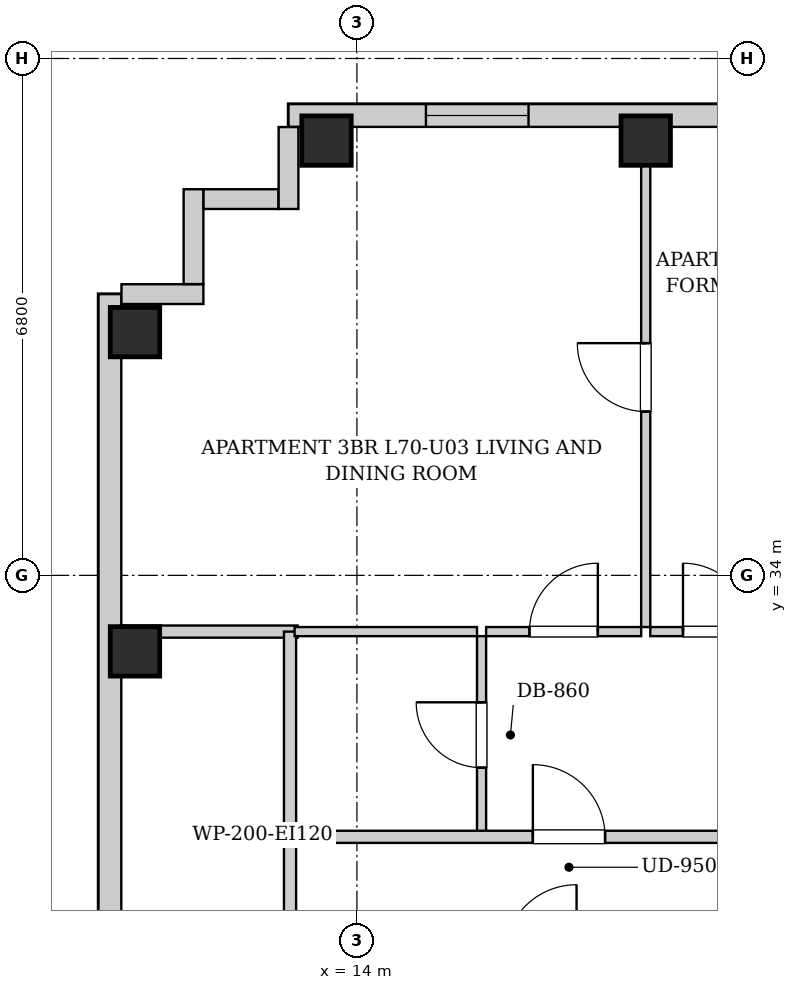
"""IFC4 building model, lengths in metres.
Left out: names, types, materials, properties, quantities, classifications, styles, units other than length and angle.
Written with IfcOpenShell. Run it as: python <this file> out.ifc"""

import sys

from ifc_helpers import new_model, si_unit, direction, frame, frame_2d, origin, origin_2d, place, context, subcontext, project, spatial, rectangle, extrude, element, fill, save


model = new_model("IFC4")
c1 = context("Model", 3, precision=1e-05, world=origin(), true_north=direction((0.0, 1.0)))
c2 = subcontext(c1, "Body", "Model", "MODEL_VIEW")
j1 = project(units=[si_unit("LENGTHUNIT", "METRE"), si_unit("PLANEANGLEUNIT", "RADIAN")], contexts=[c1])
p1 = place(None, origin())
s1 = spatial("IfcSite", under=j1, at=p1, CompositionType="ELEMENT")
p2 = place(p1, origin())
s2 = spatial("IfcBuilding", under=s1, at=p2, CompositionType="ELEMENT")
p3 = place(p2, frame((0.0, 0.0, 241.1)))
s3 = spatial("IfcBuildingStorey", under=s2, at=p3, CompositionType="ELEMENT", Elevation=241.1)
for number, where, z_axis, x_axis in (
    (1, (13.6, 39.72, 0.0), (0.0, 0.0, 1.0), (1.0, 0.0, 0.0)),
    (2, (17.8, 39.72, 0.0), (0.0, 0.0, 1.0), (1.0, 0.0, 0.0)),
    (3, (11.08, 33.0, 0.0), (0.0, 0.0, 1.0), (1.0, 0.0, 0.0)),
    (4, (11.08, 37.2, 0.0), (0.0, 0.0, 1.0), (1.0, 0.0, 0.0)),
):
    element("IfcColumn", number, at=place(p3, frame(where, z_axis=z_axis, x_axis=x_axis)), inside=s3, PredefinedType="COLUMN", context=c2, shape_type="SweptSolid", body=[
        extrude(rectangle(XDim=0.65, YDim=0.65, at=origin_2d()), origin(), (0.0, 0.0, 1.0), 3.4),
    ])
p4 = place(p3, frame((13.1, 40.05, 0.0), z_axis=(0.0, 0.0, 1.0), x_axis=(1.0, 0.0, 0.0)))
e5 = element("IfcWall", 5, at=p4, inside=s3, PredefinedType="SOLIDWALL", context=c2, shape_type="SweptSolid", body=[
    extrude(rectangle(XDim=16.4, YDim=0.3, at=frame_2d((8.2, 0.0))), origin(), (0.0, 0.0, 1.0), 3.14),
])
p5 = place(p4, frame((1.808, 0.0, 0.55)))
e6 = element("IfcOpeningElement", 6, at=p5, cuts=e5, PredefinedType="OPENING", context=c2, shape_type="SweptSolid", body=[
    extrude(rectangle(XDim=1.35, YDim=1.2, at=frame_2d((0.675, 0.6))), frame((0.0, 0.16, 0.0), z_axis=(0.0, -1.0, 0.0), x_axis=(1.0, 0.0, 0.0)), (0.0, 0.0, 1.0), 0.32),
])
p6 = place(p4, frame((6.246, 0.0, 0.55)))
e7 = element("IfcOpeningElement", 7, at=p6, cuts=e5, PredefinedType="OPENING", context=c2, shape_type="SweptSolid", body=[
    extrude(rectangle(XDim=1.35, YDim=1.2, at=frame_2d((0.675, 0.6))), frame((0.0, 0.16, 0.0), z_axis=(0.0, -1.0, 0.0), x_axis=(1.0, 0.0, 0.0)), (0.0, 0.0, 1.0), 0.32),
])
p7 = place(p4, frame((14.4, 0.0, 0.55)))
e8 = element("IfcOpeningElement", 8, at=p7, cuts=e5, PredefinedType="OPENING", context=c2, shape_type="SweptSolid", body=[
    extrude(rectangle(XDim=1.35, YDim=1.2, at=frame_2d((0.675, 0.6))), frame((0.0, 0.16, 0.0), z_axis=(0.0, -1.0, 0.0), x_axis=(1.0, 0.0, 0.0)), (0.0, 0.0, 1.0), 0.32),
])
p8 = place(p3, frame((10.75, 6.3, 0.0), z_axis=(0.0, 0.0, 1.0), x_axis=(0.0, 1.0, 0.0)))
e9 = element("IfcWall", 9, at=p8, inside=s3, PredefinedType="SOLIDWALL", context=c2, shape_type="SweptSolid", body=[
    extrude(rectangle(XDim=31.4, YDim=0.3, at=frame_2d((15.7, 0.0))), origin(), (0.0, 0.0, 1.0), 3.14),
])
p9 = place(p8, frame((1.653, 0.0, 0.55)))
e10 = element("IfcOpeningElement", 10, at=p9, cuts=e9, PredefinedType="OPENING", context=c2, shape_type="SweptSolid", body=[
    extrude(rectangle(XDim=1.35, YDim=1.2, at=frame_2d((0.675, 0.6))), frame((0.0, 0.16, 0.0), z_axis=(0.0, -1.0, 0.0), x_axis=(1.0, 0.0, 0.0)), (0.0, 0.0, 1.0), 0.32),
])
p10 = place(p8, frame((11.194, 0.0, 0.55)))
e11 = element("IfcOpeningElement", 11, at=p10, cuts=e9, PredefinedType="OPENING", context=c2, shape_type="SweptSolid", body=[
    extrude(rectangle(XDim=1.35, YDim=1.2, at=frame_2d((0.675, 0.6))), frame((0.0, 0.16, 0.0), z_axis=(0.0, -1.0, 0.0), x_axis=(1.0, 0.0, 0.0)), (0.0, 0.0, 1.0), 0.32),
])
p11 = place(p8, frame((9.185, 0.0, 0.55)))
e12 = element("IfcOpeningElement", 12, at=p11, cuts=e9, PredefinedType="OPENING", context=c2, shape_type="SweptSolid", body=[
    extrude(rectangle(XDim=1.35, YDim=1.2, at=frame_2d((0.675, 0.6))), frame((0.0, 0.16, 0.0), z_axis=(0.0, -1.0, 0.0), x_axis=(1.0, 0.0, 0.0)), (0.0, 0.0, 1.0), 0.32),
])
p12 = place(p8, frame((18.2, 0.0, 0.55)))
e13 = element("IfcOpeningElement", 13, at=p12, cuts=e9, PredefinedType="OPENING", context=c2, shape_type="SweptSolid", body=[
    extrude(rectangle(XDim=1.35, YDim=1.2, at=frame_2d((0.675, 0.6))), frame((0.0, 0.16, 0.0), z_axis=(0.0, -1.0, 0.0), x_axis=(1.0, 0.0, 0.0)), (0.0, 0.0, 1.0), 0.32),
])
p13 = place(p8, frame((19.81, 0.0, 0.55)))
e14 = element("IfcOpeningElement", 14, at=p13, cuts=e9, PredefinedType="OPENING", context=c2, shape_type="SweptSolid", body=[
    extrude(rectangle(XDim=1.35, YDim=1.2, at=frame_2d((0.675, 0.6))), frame((0.0, 0.16, 0.0), z_axis=(0.0, -1.0, 0.0), x_axis=(1.0, 0.0, 0.0)), (0.0, 0.0, 1.0), 0.32),
])
p14 = place(p3, frame((10.902, 37.7, 0.0), z_axis=(0.0, 0.0, 1.0), x_axis=(1.0, 0.0, 0.0)))
e15 = element("IfcWall", 15, at=p14, inside=s3, PredefinedType="SOLIDWALL", context=c2, shape_type="SweptSolid", body=[
    extrude(rectangle(XDim=1.078, YDim=0.26, at=frame_2d((0.539, 0.0))), origin(), (0.0, 0.0, 1.0), 3.14),
])
p15 = place(p3, frame((11.85, 37.832, 0.0), z_axis=(0.0, 0.0, 1.0), x_axis=(0.0, 1.0, 0.0)))
e16 = element("IfcWall", 16, at=p15, inside=s3, PredefinedType="SOLIDWALL", context=c2, shape_type="SweptSolid", body=[
    extrude(rectangle(XDim=1.248, YDim=0.26, at=frame_2d((0.624, 0.0))), origin(), (0.0, 0.0, 1.0), 3.14),
])
p16 = place(p3, frame((11.982, 38.95, 0.0), z_axis=(0.0, 0.0, 1.0), x_axis=(1.0, 0.0, 0.0)))
e17 = element("IfcWall", 17, at=p16, inside=s3, PredefinedType="SOLIDWALL", context=c2, shape_type="SweptSolid", body=[
    extrude(rectangle(XDim=0.986, YDim=0.26, at=frame_2d((0.493, 0.0))), origin(), (0.0, 0.0, 1.0), 3.14),
])
p17 = place(p3, frame((13.1, 38.82, 0.0), z_axis=(0.0, 0.0, 1.0), x_axis=(0.0, 1.0, 0.0)))
e18 = element("IfcWall", 18, at=p17, inside=s3, PredefinedType="SOLIDWALL", context=c2, shape_type="SweptSolid", body=[
    extrude(rectangle(XDim=1.078, YDim=0.26, at=frame_2d((0.539, 0.0))), origin(), (0.0, 0.0, 1.0), 3.14),
])
p18 = place(p3, frame((13.12, 28.98, 0.0), z_axis=(0.0, 0.0, 1.0), x_axis=(0.0, 1.0, 0.0)))
e19 = element("IfcWall", 19, at=p18, inside=s3, PredefinedType="PARTITIONING", context=c2, shape_type="SweptSolid", body=[
    extrude(rectangle(XDim=1.58, YDim=0.16, at=frame_2d((0.79, 0.0))), origin(), (0.0, 0.0, 1.0), 3.14),
])
p19 = place(p3, frame((10.88, 33.26, 0.0), z_axis=(0.0, 0.0, 1.0), x_axis=(1.0, 0.0, 0.0)))
e20 = element("IfcWall", 20, at=p19, inside=s3, PredefinedType="PARTITIONING", context=c2, shape_type="SweptSolid", body=[
    extrude(rectangle(XDim=2.34, YDim=0.16, at=frame_2d((1.17, 0.0))), origin(), (0.0, 0.0, 1.0), 3.14),
])
p20 = place(p3, frame((13.12, 30.6, 0.0), z_axis=(0.0, 0.0, 1.0), x_axis=(0.0, 1.0, 0.0)))
e21 = element("IfcWall", 21, at=p20, inside=s3, PredefinedType="PARTITIONING", context=c2, shape_type="SweptSolid", body=[
    extrude(rectangle(XDim=2.66, YDim=0.16, at=frame_2d((1.33, 0.0))), origin(), (0.0, 0.0, 1.0), 3.14),
])
p21 = place(p3, frame((15.64, 30.6, 0.0), z_axis=(0.0, 0.0, 1.0), x_axis=(0.0, 1.0, 0.0)))
e22 = element("IfcWall", 22, at=p21, inside=s3, PredefinedType="PARTITIONING", context=c2, shape_type="SweptSolid", body=[
    extrude(rectangle(XDim=2.6, YDim=0.12, at=frame_2d((1.3, 0.0))), origin(), (0.0, 0.0, 1.0), 3.14),
])
p22 = place(p21, frame((0.87, 0.0, 0.0)))
e23 = element("IfcOpeningElement", 23, at=p22, cuts=e22, PredefinedType="OPENING", context=c2, shape_type="SweptSolid", body=[
    extrude(rectangle(XDim=0.86, YDim=2.05, at=frame_2d((0.43, 1.025))), frame((0.0, 0.07, 0.0), z_axis=(0.0, -1.0, 0.0), x_axis=(1.0, 0.0, 0.0)), (0.0, 0.0, 1.0), 0.14),
])
p23 = place(p3, frame((13.18, 33.26, 0.0), z_axis=(0.0, 0.0, 1.0), x_axis=(1.0, 0.0, 0.0)))
e24 = element("IfcWall", 24, at=p23, inside=s3, PredefinedType="PARTITIONING", context=c2, shape_type="SweptSolid", body=[
    extrude(rectangle(XDim=2.4, YDim=0.12, at=frame_2d((1.2, 0.0))), origin(), (0.0, 0.0, 1.0), 3.14),
])
p24 = place(p3, frame((15.7, 33.26, 0.0), z_axis=(0.0, 0.0, 1.0), x_axis=(1.0, 0.0, 0.0)))
e25 = element("IfcWall", 25, at=p24, inside=s3, PredefinedType="PARTITIONING", context=c2, shape_type="SweptSolid", body=[
    extrude(rectangle(XDim=2.04, YDim=0.12, at=frame_2d((1.02, 0.0))), origin(), (0.0, 0.0, 1.0), 3.14),
])
p25 = place(p24, frame((0.57, 0.0, 0.0)))
e26 = element("IfcOpeningElement", 26, at=p25, cuts=e25, PredefinedType="OPENING", context=c2, shape_type="SweptSolid", body=[
    extrude(rectangle(XDim=0.9, YDim=2.05, at=frame_2d((0.45, 1.025))), frame((0.0, 0.07, 0.0), z_axis=(0.0, -1.0, 0.0), x_axis=(1.0, 0.0, 0.0)), (0.0, 0.0, 1.0), 0.14),
])
p26 = place(p3, frame((17.86, 33.26, 0.0), z_axis=(0.0, 0.0, 1.0), x_axis=(1.0, 0.0, 0.0)))
e27 = element("IfcWall", 27, at=p26, inside=s3, PredefinedType="PARTITIONING", context=c2, shape_type="SweptSolid", body=[
    extrude(rectangle(XDim=1.76, YDim=0.12, at=frame_2d((0.88, 0.0))), origin(), (0.0, 0.0, 1.0), 3.14),
])
p27 = place(p26, frame((0.43, 0.0, 0.0)))
e28 = element("IfcOpeningElement", 28, at=p27, cuts=e27, PredefinedType="OPENING", context=c2, shape_type="SweptSolid", body=[
    extrude(rectangle(XDim=0.9, YDim=2.05, at=frame_2d((0.45, 1.025))), frame((0.0, 0.07, 0.0), z_axis=(0.0, -1.0, 0.0), x_axis=(1.0, 0.0, 0.0)), (0.0, 0.0, 1.0), 0.14),
])
p28 = place(p3, frame((17.8, 33.32, 0.0), z_axis=(0.0, 0.0, 1.0), x_axis=(0.0, 1.0, 0.0)))
e29 = element("IfcWall", 29, at=p28, inside=s3, PredefinedType="PARTITIONING", context=c2, shape_type="SweptSolid", body=[
    extrude(rectangle(XDim=6.6, YDim=0.12, at=frame_2d((3.3, 0.0))), origin(), (0.0, 0.0, 1.0), 2.668),
])
p29 = place(p28, frame((2.835, 0.0, 0.0)))
e30 = element("IfcOpeningElement", 30, at=p29, cuts=e29, PredefinedType="OPENING", context=c2, shape_type="SweptSolid", body=[
    extrude(rectangle(XDim=0.9, YDim=2.05, at=frame_2d((0.45, 1.025))), frame((0.0, 0.07, 0.0), z_axis=(0.0, -1.0, 0.0), x_axis=(1.0, 0.0, 0.0)), (0.0, 0.0, 1.0), 0.14),
])
p30 = place(p3, frame((13.15, 30.56, 0.0), z_axis=(0.0, 0.0, 1.0), x_axis=(1.0, 0.0, 0.0)))
e31 = element("IfcWall", 31, at=p30, inside=s3, PredefinedType="PARTITIONING", context=c2, shape_type="SweptSolid", body=[
    extrude(rectangle(XDim=24.6, YDim=0.16, at=frame_2d((12.3, 0.0))), origin(), (0.0, 0.0, 1.0), 3.14),
])
p31 = place(p30, frame((3.165, 0.0, 0.0)))
e32 = element("IfcOpeningElement", 32, at=p31, cuts=e31, PredefinedType="OPENING", context=c2, shape_type="SweptSolid", body=[
    extrude(rectangle(XDim=0.95, YDim=2.1, at=frame_2d((0.475, 1.05))), frame((0.0, 0.09, 0.0), z_axis=(0.0, -1.0, 0.0), x_axis=(1.0, 0.0, 0.0)), (0.0, 0.0, 1.0), 0.18),
])
p32 = place(p22, origin())
e33 = element("IfcDoor", 33, at=p32, inside=s3, OperationType="SINGLE_SWING_RIGHT", PredefinedType="DOOR", context=c2, shape_type="SweptSolid", body=[
    extrude(rectangle(XDim=0.86, YDim=2.05, at=frame_2d((0.43, 1.025))), frame((0.0, 0.025, 0.0), z_axis=(0.0, -1.0, 0.0), x_axis=(1.0, 0.0, 0.0)), (0.0, 0.0, 1.0), 0.05),
])
fill(e23, e33)
p33 = place(p25, origin())
e34 = element("IfcDoor", 34, at=p33, inside=s3, OperationType="SINGLE_SWING_RIGHT", PredefinedType="DOOR", context=c2, shape_type="SweptSolid", body=[
    extrude(rectangle(XDim=0.9, YDim=2.05, at=frame_2d((0.45, 1.025))), frame((0.0, 0.025, 0.0), z_axis=(0.0, -1.0, 0.0), x_axis=(1.0, 0.0, 0.0)), (0.0, 0.0, 1.0), 0.05),
])
fill(e26, e34)
p34 = place(p27, origin())
e35 = element("IfcDoor", 35, at=p34, inside=s3, OperationType="SINGLE_SWING_LEFT", PredefinedType="DOOR", context=c2, shape_type="SweptSolid", body=[
    extrude(rectangle(XDim=0.9, YDim=2.05, at=frame_2d((0.45, 1.025))), frame((0.0, 0.025, 0.0), z_axis=(0.0, -1.0, 0.0), x_axis=(1.0, 0.0, 0.0)), (0.0, 0.0, 1.0), 0.05),
])
fill(e28, e35)
p35 = place(p29, origin())
e36 = element("IfcDoor", 36, at=p35, inside=s3, OperationType="SINGLE_SWING_RIGHT", PredefinedType="DOOR", context=c2, shape_type="SweptSolid", body=[
    extrude(rectangle(XDim=0.9, YDim=2.05, at=frame_2d((0.45, 1.025))), frame((0.0, 0.025, 0.0), z_axis=(0.0, -1.0, 0.0), x_axis=(1.0, 0.0, 0.0)), (0.0, 0.0, 1.0), 0.05),
])
fill(e30, e36)
p36 = place(p31, origin())
e37 = element("IfcDoor", 37, at=p36, inside=s3, OperationType="SINGLE_SWING_LEFT", PredefinedType="DOOR", context=c2, shape_type="SweptSolid", body=[
    extrude(rectangle(XDim=0.95, YDim=2.1, at=frame_2d((0.475, 1.05))), frame((0.0, 0.025, 0.0), z_axis=(0.0, -1.0, 0.0), x_axis=(1.0, 0.0, 0.0)), (0.0, 0.0, 1.0), 0.05),
])
fill(e32, e37)
p37 = place(p5, origin())
e38 = element("IfcWindow", 38, at=p37, inside=s3, PartitioningType="SINGLE_PANEL", PredefinedType="WINDOW", context=c2, shape_type="SweptSolid", body=[
    extrude(rectangle(XDim=1.35, YDim=1.2, at=frame_2d((0.675, 0.6))), frame((0.0, 0.03, 0.0), z_axis=(0.0, -1.0, 0.0), x_axis=(1.0, 0.0, 0.0)), (0.0, 0.0, 1.0), 0.06),
])
fill(e6, e38)
save(model, sys.argv[1])
